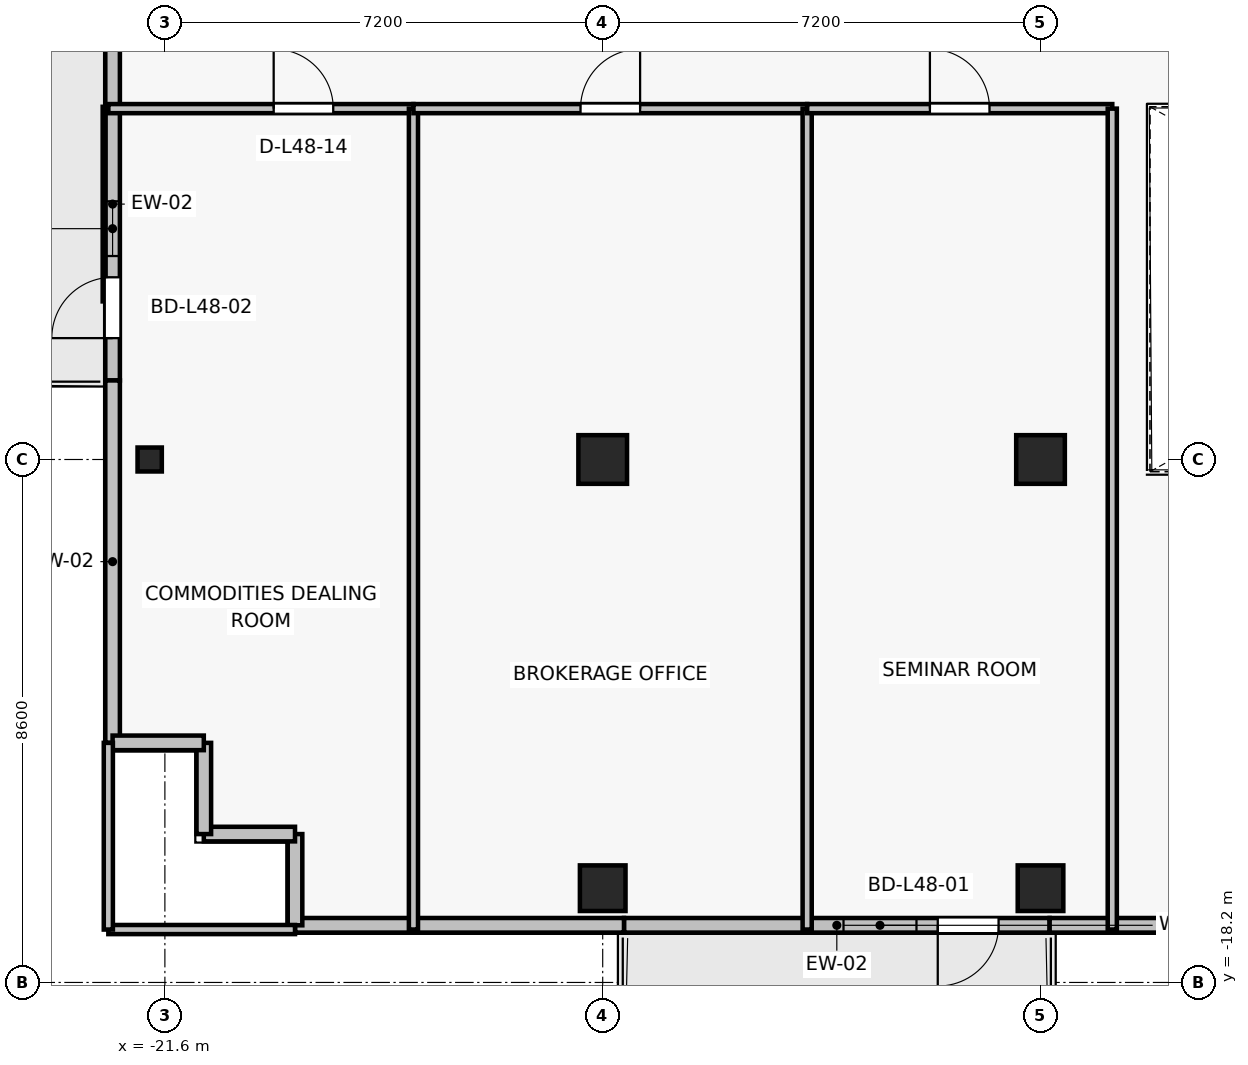
"""IFC4 building model, lengths in metres.
Left out: names, types, materials, properties, quantities, classifications, styles, units other than length and angle.
Written with IfcOpenShell. Run it as: python <this file> out.ifc"""

import sys

from ifc_helpers import new_model, si_unit, direction, frame, frame_2d, origin, origin_2d, place, context, subcontext, project, spatial, rectangle, i_section, extrude, source, transform, mapped, element, fill, save


model = new_model("IFC4")
c1 = context("Model", 3, precision=1e-05, world=origin(), true_north=direction((0.0, 1.0)))
c2 = subcontext(c1, "Body", "Model", "MODEL_VIEW")
j1 = project(units=[si_unit("LENGTHUNIT", "METRE"), si_unit("PLANEANGLEUNIT", "RADIAN")], contexts=[c1])
p1 = place(None, origin())
s1 = spatial("IfcSite", under=j1, at=p1, CompositionType="ELEMENT")
p2 = place(p1, origin())
s2 = spatial("IfcBuilding", under=s1, at=p2, CompositionType="ELEMENT")
p3 = place(p2, frame((0.0, 0.0, 172.6)))
s3 = spatial("IfcBuildingStorey", under=s2, at=p3, CompositionType="ELEMENT", Elevation=172.6)
for number, where, z_axis, x_axis in (
    (1, (-14.4, -9.6, 0.0), (0.0, 0.0, 1.0), (1.0, 0.0, 0.0)),
    (2, (-7.2, -9.6, 0.0), (0.0, 0.0, 1.0), (1.0, 0.0, 0.0)),
):
    element("IfcColumn", number, at=place(p3, frame(where, z_axis=z_axis, x_axis=x_axis)), inside=s3, PredefinedType="COLUMN", context=c2, shape_type="SweptSolid", body=[
        extrude(rectangle(XDim=0.8, YDim=0.8, at=origin_2d()), origin(), (0.0, 0.0, 1.0), 3.3),
    ])
for number, where, z_axis, x_axis in (
    (3, (-14.4, -16.65, 0.0), (0.0, 0.0, 1.0), (1.0, 0.0, 0.0)),
    (4, (-7.2, -16.65, 0.0), (0.0, 0.0, 1.0), (1.0, 0.0, 0.0)),
):
    element("IfcColumn", number, at=place(p3, frame(where, z_axis=z_axis, x_axis=x_axis)), inside=s3, PredefinedType="COLUMN", context=c2, shape_type="SweptSolid", body=[
        extrude(rectangle(XDim=0.75, YDim=0.75, at=origin_2d()), origin(), (0.0, 0.0, 1.0), 3.3),
    ])
p4 = place(p3, frame((-21.85, -9.6, 0.0), z_axis=(0.0, 0.0, 1.0), x_axis=(1.0, 0.0, 0.0)))
e5 = element("IfcColumn", 5, at=p4, inside=s3, PredefinedType="COLUMN", context=c2, shape_type="SweptSolid", body=[
    extrude(i_section(OverallWidth=0.399, OverallDepth=0.394, WebThickness=0.023, FlangeThickness=0.037, FilletRadius=0.015, at=origin_2d()), origin(), (0.0, 0.0, 1.0), 3.3),
])
p5 = place(p3, frame((-7.05, -17.26, 0.0), z_axis=(0.0, 0.0, 1.0), x_axis=(-1.0, 0.0, 0.0)))
e6 = element("IfcWall", 6, at=p5, inside=s3, PredefinedType="SOLIDWALL", context=c2, shape_type="SweptSolid", body=[
    extrude(rectangle(XDim=7.0, YDim=0.24, at=frame_2d((3.5, 0.0))), origin(), (0.0, 0.0, 1.0), 2.665),
])
p6 = place(p5, frame((0.84, 0.0, 0.0)))
e7 = element("IfcOpeningElement", 7, at=p6, cuts=e6, PredefinedType="OPENING", context=c2, shape_type="SweptSolid", body=[
    extrude(rectangle(XDim=1.0, YDim=2.2, at=frame_2d((0.5, 1.1))), frame((0.0, 0.13, 0.0), z_axis=(0.0, -1.0, 0.0), x_axis=(1.0, 0.0, 0.0)), (0.0, 0.0, 1.0), 0.26),
])
p7 = place(p5, frame((2.19, 0.0, 0.85)))
e8 = element("IfcOpeningElement", 8, at=p7, cuts=e6, PredefinedType="OPENING", context=c2, shape_type="SweptSolid", body=[
    extrude(rectangle(XDim=1.2, YDim=1.5, at=frame_2d((0.6, 0.75))), frame((0.0, 0.13, 0.0), z_axis=(0.0, -1.0, 0.0), x_axis=(1.0, 0.0, 0.0)), (0.0, 0.0, 1.0), 0.26),
])
p8 = place(p3, frame((-22.46, -8.3, 0.0), z_axis=(0.0, 0.0, 1.0), x_axis=(0.0, 1.0, 0.0)))
e9 = element("IfcWall", 9, at=p8, inside=s3, PredefinedType="SOLIDWALL", context=c2, shape_type="SweptSolid", body=[
    extrude(rectangle(XDim=5.8, YDim=0.24, at=frame_2d((2.9, 0.0))), origin(), (0.0, 0.0, 1.0), 3.075),
])
p9 = place(p8, frame((0.696, 0.0, 0.0)))
e10 = element("IfcOpeningElement", 10, at=p9, cuts=e9, PredefinedType="OPENING", context=c2, shape_type="SweptSolid", body=[
    extrude(rectangle(XDim=1.0, YDim=2.2, at=frame_2d((0.5, 1.1))), frame((0.0, 0.13, 0.0), z_axis=(0.0, -1.0, 0.0), x_axis=(1.0, 0.0, 0.0)), (0.0, 0.0, 1.0), 0.26),
])
p10 = place(p8, frame((2.046, 0.0, 0.85)))
e11 = element("IfcOpeningElement", 11, at=p10, cuts=e9, PredefinedType="OPENING", context=c2, shape_type="SweptSolid", body=[
    extrude(rectangle(XDim=0.9, YDim=1.35, at=frame_2d((0.45, 0.675))), frame((0.0, 0.13, 0.0), z_axis=(0.0, -1.0, 0.0), x_axis=(1.0, 0.0, 0.0)), (0.0, 0.0, 1.0), 0.26),
])
p11 = place(p3, frame((-22.46, -8.3, 0.0), z_axis=(0.0, 0.0, 1.0), x_axis=(0.0, -1.0, 0.0)))
e12 = element("IfcWall", 12, at=p11, inside=s3, PredefinedType="SOLIDWALL", context=c2, shape_type="SweptSolid", body=[
    extrude(rectangle(XDim=5.96, YDim=0.24, at=frame_2d((2.98, 0.0))), origin(), (0.0, 0.0, 1.0), 3.075),
])
p12 = place(p3, frame((-7.05, -17.26, 0.0), z_axis=(0.0, 0.0, 1.0), x_axis=(1.0, 0.0, 0.0)))
e13 = element("IfcWall", 13, at=p12, inside=s3, PredefinedType="SOLIDWALL", context=c2, shape_type="SweptSolid", body=[
    extrude(rectangle(XDim=3.85, YDim=0.24, at=frame_2d((1.925, 0.0))), origin(), (0.0, 0.0, 1.0), 3.075),
])
p13 = place(p3, frame((-19.46, -17.26, 0.0), z_axis=(0.0, 0.0, 1.0), x_axis=(1.0, 0.0, 0.0)))
e14 = element("IfcWall", 14, at=p13, inside=s3, PredefinedType="SOLIDWALL", context=c2, shape_type="SweptSolid", body=[
    extrude(rectangle(XDim=5.41, YDim=0.24, at=frame_2d((2.705, 0.0))), origin(), (0.0, 0.0, 1.0), 3.075),
])
for number, where, z_axis, x_axis in (
    (15, (-19.46, -15.76, 0.0), (0.0, 0.0, 1.0), (0.0, -1.0, 0.0)),
    (16, (-20.96, -15.76, 0.0), (0.0, 0.0, 1.0), (1.0, 0.0, 0.0)),
    (17, (-20.96, -14.26, 0.0), (0.0, 0.0, 1.0), (0.0, -1.0, 0.0)),
    (18, (-22.46, -14.26, 0.0), (0.0, 0.0, 1.0), (1.0, 0.0, 0.0)),
):
    element("IfcWall", number, at=place(p3, frame(where, z_axis=z_axis, x_axis=x_axis)), inside=s3, PredefinedType="SOLIDWALL", context=c2, shape_type="SweptSolid", body=[
        extrude(rectangle(XDim=1.5, YDim=0.24, at=frame_2d((0.75, 0.0))), origin(), (0.0, 0.0, 1.0), 3.075),
    ])
p14 = place(p3, frame((-19.46, -17.33, 0.0), z_axis=(0.0, 0.0, 1.0), x_axis=(-1.0, 0.0, 0.0)))
e19 = element("IfcWall", 19, at=p14, inside=s3, PredefinedType="PARTITIONING", context=c2, shape_type="SweptSolid", body=[
    extrude(rectangle(XDim=3.07, YDim=0.15, at=frame_2d((1.535, 0.0))), origin(), (0.0, 0.0, 1.0), 3.075),
])
p15 = place(p3, frame((-22.53, -3.83, 0.0), z_axis=(0.0, 0.0, 1.0), x_axis=(1.0, 0.0, 0.0)))
e20 = element("IfcWall", 20, at=p15, inside=s3, PredefinedType="PARTITIONING", context=c2, shape_type="SweptSolid", body=[
    extrude(rectangle(XDim=5.018, YDim=0.15, at=frame_2d((2.509, 0.0))), origin(), (0.0, 0.0, 1.0), 2.565),
])
p16 = place(p15, frame((2.719, 0.0, 0.0)))
e21 = element("IfcOpeningElement", 21, at=p16, cuts=e20, PredefinedType="OPENING", context=c2, shape_type="SweptSolid", body=[
    extrude(rectangle(XDim=0.98, YDim=2.15, at=frame_2d((0.49, 1.075))), frame((0.0, 0.085, 0.0), z_axis=(0.0, -1.0, 0.0), x_axis=(1.0, 0.0, 0.0)), (0.0, 0.0, 1.0), 0.17),
])
p17 = place(p3, frame((-22.53, -17.33, 0.0), z_axis=(0.0, 0.0, 1.0), x_axis=(0.0, 1.0, 0.0)))
e22 = element("IfcWall", 22, at=p17, inside=s3, PredefinedType="PARTITIONING", context=c2, shape_type="SweptSolid", body=[
    extrude(rectangle(XDim=3.07, YDim=0.15, at=frame_2d((1.535, 0.0))), origin(), (0.0, 0.0, 1.0), 3.075),
])
p18 = place(p3, frame((-17.512, -3.83, 0.0), z_axis=(0.0, 0.0, 1.0), x_axis=(0.0, -1.0, 0.0)))
e23 = element("IfcWall", 23, at=p18, inside=s3, PredefinedType="PARTITIONING", context=c2, shape_type="SweptSolid", body=[
    extrude(rectangle(XDim=13.5, YDim=0.15, at=frame_2d((6.75, 0.0))), origin(), (0.0, 0.0, 1.0), 2.565),
])
p19 = place(p3, frame((-17.512, -3.83, 0.0), z_axis=(0.0, 0.0, 1.0), x_axis=(1.0, 0.0, 0.0)))
e24 = element("IfcWall", 24, at=p19, inside=s3, PredefinedType="PARTITIONING", context=c2, shape_type="SweptSolid", body=[
    extrude(rectangle(XDim=6.475, YDim=0.15, at=frame_2d((3.237, 0.0))), origin(), (0.0, 0.0, 1.0), 2.565),
])
p20 = place(p19, frame((2.747, 0.0, 0.0)))
e25 = element("IfcOpeningElement", 25, at=p20, cuts=e24, PredefinedType="OPENING", context=c2, shape_type="SweptSolid", body=[
    extrude(rectangle(XDim=0.98, YDim=2.15, at=frame_2d((0.49, 1.075))), frame((0.0, 0.085, 0.0), z_axis=(0.0, -1.0, 0.0), x_axis=(1.0, 0.0, 0.0)), (0.0, 0.0, 1.0), 0.17),
])
p21 = place(p3, frame((-11.038, -3.83, 0.0), z_axis=(0.0, 0.0, 1.0), x_axis=(0.0, -1.0, 0.0)))
e26 = element("IfcWall", 26, at=p21, inside=s3, PredefinedType="PARTITIONING", context=c2, shape_type="SweptSolid", body=[
    extrude(rectangle(XDim=13.5, YDim=0.15, at=frame_2d((6.75, 0.0))), origin(), (0.0, 0.0, 1.0), 2.565),
])
p22 = place(p3, frame((-11.038, -3.83, 0.0), z_axis=(0.0, 0.0, 1.0), x_axis=(1.0, 0.0, 0.0)))
e27 = element("IfcWall", 27, at=p22, inside=s3, PredefinedType="PARTITIONING", context=c2, shape_type="SweptSolid", body=[
    extrude(rectangle(XDim=5.018, YDim=0.15, at=frame_2d((2.509, 0.0))), origin(), (0.0, 0.0, 1.0), 2.565),
])
p23 = place(p22, frame((2.019, 0.0, 0.0)))
e28 = element("IfcOpeningElement", 28, at=p23, cuts=e27, PredefinedType="OPENING", context=c2, shape_type="SweptSolid", body=[
    extrude(rectangle(XDim=0.98, YDim=2.15, at=frame_2d((0.49, 1.075))), frame((0.0, 0.085, 0.0), z_axis=(0.0, -1.0, 0.0), x_axis=(1.0, 0.0, 0.0)), (0.0, 0.0, 1.0), 0.17),
])
p24 = place(p3, frame((-6.02, -3.83, 0.0), z_axis=(0.0, 0.0, 1.0), x_axis=(0.0, -1.0, 0.0)))
e29 = element("IfcWall", 29, at=p24, inside=s3, PredefinedType="PARTITIONING", context=c2, shape_type="SweptSolid", body=[
    extrude(rectangle(XDim=13.5, YDim=0.15, at=frame_2d((6.75, 0.0))), origin(), (0.0, 0.0, 1.0), 2.565),
])
m1 = source(origin(), c2, "Body", "SweptSolid", [
    extrude(rectangle(XDim=1.0, YDim=2.2, at=frame_2d((0.5, 1.1))), frame((0.0, 0.025, 0.0), z_axis=(0.0, -1.0, 0.0), x_axis=(1.0, 0.0, 0.0)), (0.0, 0.0, 1.0), 0.05),
])
p25 = place(p6, origin())
e30 = element("IfcDoor", 30, at=p25, inside=s3, OperationType="SINGLE_SWING_RIGHT", PredefinedType="DOOR", context=c2, shape_type="MappedRepresentation", body=[
    mapped(m1, transform((0.0, 0.0, 0.0), x_axis=(1.0, 0.0, 0.0), y_axis=(0.0, 1.0, 0.0), z_axis=(0.0, 0.0, 1.0), scale=1.0)),
])
fill(e7, e30)
m2 = source(origin(), c2, "Body", "SweptSolid", [
    extrude(rectangle(XDim=1.2, YDim=1.5, at=frame_2d((0.6, 0.75))), frame((0.0, 0.03, 0.0), z_axis=(0.0, -1.0, 0.0), x_axis=(1.0, 0.0, 0.0)), (0.0, 0.0, 1.0), 0.06),
])
p26 = place(p7, origin())
e31 = element("IfcWindow", 31, at=p26, inside=s3, PartitioningType="SINGLE_PANEL", PredefinedType="WINDOW", context=c2, shape_type="MappedRepresentation", body=[
    mapped(m2, transform((0.0, 0.0, 0.0), x_axis=(1.0, 0.0, 0.0), y_axis=(0.0, 1.0, 0.0), z_axis=(0.0, 0.0, 1.0), scale=1.0)),
])
fill(e8, e31)
p27 = place(p9, origin())
e32 = element("IfcDoor", 32, at=p27, inside=s3, OperationType="SINGLE_SWING_LEFT", PredefinedType="DOOR", context=c2, shape_type="MappedRepresentation", body=[
    mapped(m1, transform((0.0, 0.0, 0.0), x_axis=(1.0, 0.0, 0.0), y_axis=(0.0, 1.0, 0.0), z_axis=(0.0, 0.0, 1.0), scale=1.0)),
])
fill(e10, e32)
m3 = source(origin(), c2, "Body", "SweptSolid", [
    extrude(rectangle(XDim=0.9, YDim=1.35, at=frame_2d((0.45, 0.675))), frame((0.0, 0.03, 0.0), z_axis=(0.0, -1.0, 0.0), x_axis=(1.0, 0.0, 0.0)), (0.0, 0.0, 1.0), 0.06),
])
p28 = place(p10, origin())
e33 = element("IfcWindow", 33, at=p28, inside=s3, PartitioningType="SINGLE_PANEL", PredefinedType="WINDOW", context=c2, shape_type="MappedRepresentation", body=[
    mapped(m3, transform((0.0, 0.0, 0.0), x_axis=(1.0, 0.0, 0.0), y_axis=(0.0, 1.0, 0.0), z_axis=(0.0, 0.0, 1.0), scale=1.0)),
])
fill(e11, e33)
m4 = source(origin(), c2, "Body", "SweptSolid", [
    extrude(rectangle(XDim=0.98, YDim=2.15, at=frame_2d((0.49, 1.075))), frame((0.0, 0.025, 0.0), z_axis=(0.0, -1.0, 0.0), x_axis=(1.0, 0.0, 0.0)), (0.0, 0.0, 1.0), 0.05),
])
p29 = place(p16, origin())
e34 = element("IfcDoor", 34, at=p29, inside=s3, OperationType="SINGLE_SWING_LEFT", PredefinedType="DOOR", context=c2, shape_type="MappedRepresentation", body=[
    mapped(m4, transform((0.0, 0.0, 0.0), x_axis=(1.0, 0.0, 0.0), y_axis=(0.0, 1.0, 0.0), z_axis=(0.0, 0.0, 1.0), scale=1.0)),
])
fill(e21, e34)
p30 = place(p20, origin())
e35 = element("IfcDoor", 35, at=p30, inside=s3, OperationType="SINGLE_SWING_RIGHT", PredefinedType="DOOR", context=c2, shape_type="MappedRepresentation", body=[
    mapped(m4, transform((0.0, 0.0, 0.0), x_axis=(1.0, 0.0, 0.0), y_axis=(0.0, 1.0, 0.0), z_axis=(0.0, 0.0, 1.0), scale=1.0)),
])
fill(e25, e35)
p31 = place(p23, origin())
e36 = element("IfcDoor", 36, at=p31, inside=s3, OperationType="SINGLE_SWING_LEFT", PredefinedType="DOOR", context=c2, shape_type="MappedRepresentation", body=[
    mapped(m4, transform((0.0, 0.0, 0.0), x_axis=(1.0, 0.0, 0.0), y_axis=(0.0, 1.0, 0.0), z_axis=(0.0, 0.0, 1.0), scale=1.0)),
])
fill(e28, e36)
save(model, sys.argv[1])
